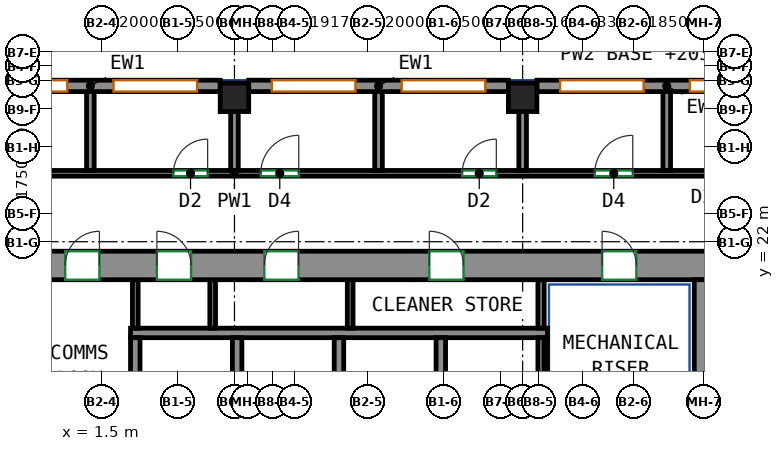
"""IFC4 building model, lengths in metres.
Left out: names, types, materials, properties, quantities, classifications, styles, units other than length and angle.
Written with IfcOpenShell. Run it as: python <this file> out.ifc"""

import sys

from ifc_helpers import new_model, si_unit, direction, frame, frame_2d, origin, origin_2d, place, context, subcontext, project, spatial, rectangle, extrude, source, transform, mapped, element, fill, save


model = new_model("IFC4")
c1 = context("Model", 3, precision=1e-05, world=origin(), true_north=direction((0.0, 1.0)))
c2 = subcontext(c1, "Body", "Model", "MODEL_VIEW")
j1 = project(units=[si_unit("LENGTHUNIT", "METRE"), si_unit("PLANEANGLEUNIT", "RADIAN")], contexts=[c1])
p1 = place(None, origin())
s1 = spatial("IfcSite", under=j1, at=p1, CompositionType="ELEMENT")
p2 = place(p1, origin())
s2 = spatial("IfcBuilding", under=s1, at=p2, CompositionType="ELEMENT")
p3 = place(p2, frame((0.0, 0.0, 203.3)))
s3 = spatial("IfcBuildingStorey", under=s2, at=p3, CompositionType="ELEMENT", Elevation=203.3)
m1 = source(origin(), c2, "Body", "SweptSolid", [
    extrude(rectangle(XDim=0.75, YDim=0.75, at=origin_2d()), origin(), (0.0, 0.0, 1.0), 3.12),
])
for number, where, z_axis, x_axis in (
    (1, (5.0, 25.8, 0.0), (0.0, 0.0, 1.0), (1.0, 0.0, 0.0)),
    (2, (12.583, 25.8, 0.0), (0.0, 0.0, 1.0), (1.0, 0.0, 0.0)),
):
    element("IfcColumn", number, at=place(p3, frame(where, z_axis=z_axis, x_axis=x_axis)), inside=s3, PredefinedType="COLUMN", context=c2, shape_type="MappedRepresentation", body=[
        mapped(m1, transform((0.0, 0.0, 0.0))),
    ])
m2 = source(origin(), c2, "Body", "SweptSolid", [
    extrude(rectangle(XDim=33.6, YDim=0.75, at=frame_2d((16.8, 0.0))), origin(), (0.0, 0.0, 1.0), 3.12),
])
p4 = place(p3, frame((-15.75, 21.375, 0.0), z_axis=(0.0, 0.0, 1.0), x_axis=(1.0, 0.0, 0.0)))
e3 = element("IfcWall", 3, at=p4, inside=s3, PredefinedType="SHEAR", context=c2, shape_type="MappedRepresentation", body=[
    mapped(m2, transform((0.0, 0.0, 0.0))),
])
p5 = place(p4, frame((6.581, 0.0, 0.0)))
e4 = element("IfcOpeningElement", 4, at=p5, cuts=e3, PredefinedType="OPENING", context=c2, shape_type="SweptSolid", body=[
    extrude(rectangle(XDim=0.9, YDim=2.1, at=frame_2d((0.45, 1.05))), frame((0.0, 0.385, 0.0), z_axis=(0.0, -1.0, 0.0), x_axis=(1.0, 0.0, 0.0)), (0.0, 0.0, 1.0), 0.77),
])
p6 = place(p4, frame((11.888, 0.0, 0.0)))
e5 = element("IfcOpeningElement", 5, at=p6, cuts=e3, PredefinedType="OPENING", context=c2, shape_type="SweptSolid", body=[
    extrude(rectangle(XDim=0.9, YDim=2.1, at=frame_2d((0.45, 1.05))), frame((0.0, 0.385, 0.0), z_axis=(0.0, -1.0, 0.0), x_axis=(1.0, 0.0, 0.0)), (0.0, 0.0, 1.0), 0.77),
])
p7 = place(p4, frame((16.296, 0.0, 0.0)))
e6 = element("IfcOpeningElement", 6, at=p7, cuts=e3, PredefinedType="OPENING", context=c2, shape_type="SweptSolid", body=[
    extrude(rectangle(XDim=0.9, YDim=2.1, at=frame_2d((0.45, 1.05))), frame((0.0, 0.385, 0.0), z_axis=(0.0, -1.0, 0.0), x_axis=(1.0, 0.0, 0.0)), (0.0, 0.0, 1.0), 0.77),
])
p8 = place(p4, frame((18.708, 0.0, 0.0)))
e7 = element("IfcOpeningElement", 7, at=p8, cuts=e3, PredefinedType="OPENING", context=c2, shape_type="SweptSolid", body=[
    extrude(rectangle(XDim=0.9, YDim=2.1, at=frame_2d((0.45, 1.05))), frame((0.0, 0.385, 0.0), z_axis=(0.0, -1.0, 0.0), x_axis=(1.0, 0.0, 0.0)), (0.0, 0.0, 1.0), 0.77),
])
p9 = place(p4, frame((21.536, 0.0, 0.0)))
e8 = element("IfcOpeningElement", 8, at=p9, cuts=e3, PredefinedType="OPENING", context=c2, shape_type="SweptSolid", body=[
    extrude(rectangle(XDim=0.9, YDim=2.1, at=frame_2d((0.45, 1.05))), frame((0.0, 0.385, 0.0), z_axis=(0.0, -1.0, 0.0), x_axis=(1.0, 0.0, 0.0)), (0.0, 0.0, 1.0), 0.77),
])
p10 = place(p4, frame((25.877, 0.0, 0.0)))
e9 = element("IfcOpeningElement", 9, at=p10, cuts=e3, PredefinedType="OPENING", context=c2, shape_type="SweptSolid", body=[
    extrude(rectangle(XDim=0.9, YDim=2.1, at=frame_2d((0.45, 1.05))), frame((0.0, 0.385, 0.0), z_axis=(0.0, -1.0, 0.0), x_axis=(1.0, 0.0, 0.0)), (0.0, 0.0, 1.0), 0.77),
])
p11 = place(p4, frame((2.275, 0.0, 0.0)))
e10 = element("IfcOpeningElement", 10, at=p11, cuts=e3, PredefinedType="OPENING", context=c2, shape_type="SweptSolid", body=[
    extrude(rectangle(XDim=0.9, YDim=2.1, at=frame_2d((0.45, 1.05))), frame((0.0, 0.385, 0.0), z_axis=(0.0, -1.0, 0.0), x_axis=(1.0, 0.0, 0.0)), (0.0, 0.0, 1.0), 0.77),
])
p12 = place(p4, frame((30.425, 0.0, 0.0)))
e11 = element("IfcOpeningElement", 11, at=p12, cuts=e3, PredefinedType="OPENING", context=c2, shape_type="SweptSolid", body=[
    extrude(rectangle(XDim=0.9, YDim=2.1, at=frame_2d((0.45, 1.05))), frame((0.0, 0.385, 0.0), z_axis=(0.0, -1.0, 0.0), x_axis=(1.0, 0.0, 0.0)), (0.0, 0.0, 1.0), 0.77),
])
m3 = source(origin(), c2, "Body", "SweptSolid", [
    extrude(rectangle(XDim=12.0, YDim=0.75, at=frame_2d((6.0, 0.0))), origin(), (0.0, 0.0, 1.0), 3.12),
])
p13 = place(p3, frame((17.475, 9.0, 0.0), z_axis=(0.0, 0.0, 1.0), x_axis=(0.0, 1.0, 0.0)))
e12 = element("IfcWall", 12, at=p13, inside=s3, PredefinedType="SHEAR", context=c2, shape_type="MappedRepresentation", body=[
    mapped(m3, transform((0.0, 0.0, 0.0))),
])
m4 = source(origin(), c2, "Body", "SweptSolid", [
    extrude(rectangle(XDim=6.833, YDim=0.3, at=frame_2d((3.417, 0.0))), origin(), (0.0, 0.0, 1.0), 3.12),
])
p14 = place(p3, frame((19.792, 26.1, 0.0), z_axis=(0.0, 0.0, 1.0), x_axis=(-1.0, 0.0, 0.0)))
e13 = element("IfcWall", 13, at=p14, inside=s3, PredefinedType="SOLIDWALL", context=c2, shape_type="MappedRepresentation", body=[
    mapped(m4, transform((0.0, 0.0, 0.0))),
])
p15 = place(p14, frame((0.608, 0.0, 0.85)))
e14 = element("IfcOpeningElement", 14, at=p15, cuts=e13, PredefinedType="OPENING", context=c2, shape_type="SweptSolid", body=[
    extrude(rectangle(XDim=2.2, YDim=1.95, at=frame_2d((1.1, 0.975))), frame((0.0, 0.16, 0.0), z_axis=(0.0, -1.0, 0.0), x_axis=(1.0, 0.0, 0.0)), (0.0, 0.0, 1.0), 0.32),
])
p16 = place(p14, frame((4.025, 0.0, 0.85)))
e15 = element("IfcOpeningElement", 15, at=p16, cuts=e13, PredefinedType="OPENING", context=c2, shape_type="SweptSolid", body=[
    extrude(rectangle(XDim=2.2, YDim=1.95, at=frame_2d((1.1, 0.975))), frame((0.0, 0.16, 0.0), z_axis=(0.0, -1.0, 0.0), x_axis=(1.0, 0.0, 0.0)), (0.0, 0.0, 1.0), 0.32),
])
m5 = source(origin(), c2, "Body", "SweptSolid", [
    extrude(rectangle(XDim=6.833, YDim=0.3, at=frame_2d((3.417, 0.0))), origin(), (0.0, 0.0, 1.0), 3.12),
])
p17 = place(p3, frame((12.208, 26.1, 0.0), z_axis=(0.0, 0.0, 1.0), x_axis=(-1.0, 0.0, 0.0)))
e16 = element("IfcWall", 16, at=p17, inside=s3, PredefinedType="SOLIDWALL", context=c2, shape_type="MappedRepresentation", body=[
    mapped(m5, transform((0.0, 0.0, 0.0))),
])
p18 = place(p17, frame((0.608, 0.0, 0.85)))
e17 = element("IfcOpeningElement", 17, at=p18, cuts=e16, PredefinedType="OPENING", context=c2, shape_type="SweptSolid", body=[
    extrude(rectangle(XDim=2.2, YDim=1.95, at=frame_2d((1.1, 0.975))), frame((0.0, 0.16, 0.0), z_axis=(0.0, -1.0, 0.0), x_axis=(1.0, 0.0, 0.0)), (0.0, 0.0, 1.0), 0.32),
])
p19 = place(p17, frame((4.025, 0.0, 0.85)))
e18 = element("IfcOpeningElement", 18, at=p19, cuts=e16, PredefinedType="OPENING", context=c2, shape_type="SweptSolid", body=[
    extrude(rectangle(XDim=2.2, YDim=1.95, at=frame_2d((1.1, 0.975))), frame((0.0, 0.16, 0.0), z_axis=(0.0, -1.0, 0.0), x_axis=(1.0, 0.0, 0.0)), (0.0, 0.0, 1.0), 0.32),
])
p20 = place(p3, frame((4.625, 26.1, 0.0), z_axis=(0.0, 0.0, 1.0), x_axis=(-1.0, 0.0, 0.0)))
e19 = element("IfcWall", 19, at=p20, inside=s3, PredefinedType="SOLIDWALL", context=c2, shape_type="MappedRepresentation", body=[
    mapped(m5, transform((0.0, 0.0, 0.0))),
])
p21 = place(p20, frame((0.608, 0.0, 0.85)))
e20 = element("IfcOpeningElement", 20, at=p21, cuts=e19, PredefinedType="OPENING", context=c2, shape_type="SweptSolid", body=[
    extrude(rectangle(XDim=2.2, YDim=1.95, at=frame_2d((1.1, 0.975))), frame((0.0, 0.16, 0.0), z_axis=(0.0, -1.0, 0.0), x_axis=(1.0, 0.0, 0.0)), (0.0, 0.0, 1.0), 0.32),
])
p22 = place(p20, frame((4.025, 0.0, 0.85)))
e21 = element("IfcOpeningElement", 21, at=p22, cuts=e19, PredefinedType="OPENING", context=c2, shape_type="SweptSolid", body=[
    extrude(rectangle(XDim=2.2, YDim=1.95, at=frame_2d((1.1, 0.975))), frame((0.0, 0.16, 0.0), z_axis=(0.0, -1.0, 0.0), x_axis=(1.0, 0.0, 0.0)), (0.0, 0.0, 1.0), 0.32),
])
m6 = source(origin(), c2, "Body", "SweptSolid", [
    extrude(rectangle(XDim=10.97, YDim=0.25, at=frame_2d((5.485, 0.0))), origin(), (0.0, 0.0, 1.0), 3.12),
])
p23 = place(p3, frame((2.265, 19.6, 0.0), z_axis=(0.0, 0.0, 1.0), x_axis=(1.0, 0.0, 0.0)))
e22 = element("IfcWall", 22, at=p23, inside=s3, PredefinedType="PARTITIONING", context=c2, shape_type="MappedRepresentation", body=[
    mapped(m6, transform((0.0, 0.0, 0.0))),
])
m7 = source(origin(), c2, "Body", "SweptSolid", [
    extrude(rectangle(XDim=3.275, YDim=0.165, at=frame_2d((1.638, 0.0))), origin(), (0.0, 0.0, 1.0), 3.12),
])
p24 = place(p3, frame((13.067, 16.2, 0.0), z_axis=(0.0, 0.0, 1.0), x_axis=(0.0, 1.0, 0.0)))
e23 = element("IfcWall", 23, at=p24, inside=s3, PredefinedType="PARTITIONING", context=c2, shape_type="MappedRepresentation", body=[
    mapped(m7, transform((0.0, 0.0, 0.0))),
])
m8 = source(origin(), c2, "Body", "SweptSolid", [
    extrude(rectangle(XDim=1.275, YDim=0.165, at=frame_2d((0.637, 0.0))), origin(), (0.0, 0.0, 1.0), 3.12),
])
p25 = place(p3, frame((13.067, 19.725, 0.0), z_axis=(0.0, 0.0, 1.0), x_axis=(0.0, 1.0, 0.0)))
e24 = element("IfcWall", 24, at=p25, inside=s3, PredefinedType="PARTITIONING", context=c2, shape_type="MappedRepresentation", body=[
    mapped(m8, transform((0.0, 0.0, 0.0))),
])
m9 = source(origin(), c2, "Body", "SweptSolid", [
    extrude(rectangle(XDim=3.275, YDim=0.25, at=frame_2d((1.638, 0.0))), origin(), (0.0, 0.0, 1.0), 3.12),
])
p26 = place(p3, frame((10.43, 16.2, 0.0), z_axis=(0.0, 0.0, 1.0), x_axis=(0.0, 1.0, 0.0)))
e25 = element("IfcWall", 25, at=p26, inside=s3, PredefinedType="PARTITIONING", context=c2, shape_type="MappedRepresentation", body=[
    mapped(m9, transform((0.0, 0.0, 0.0))),
])
m10 = source(origin(), c2, "Body", "SweptSolid", [
    extrude(rectangle(XDim=2.725, YDim=0.085, at=frame_2d((1.363, 0.0))), origin(), (0.0, 0.0, 1.0), 3.12),
])
p27 = place(p3, frame((13.192, 16.75, 0.0), z_axis=(0.0, 0.0, 1.0), x_axis=(0.0, 1.0, 0.0)))
e26 = element("IfcWall", 26, at=p27, inside=s3, PredefinedType="PARTITIONING", context=c2, shape_type="MappedRepresentation", body=[
    mapped(m10, transform((0.0, 0.0, 0.0))),
])
for number, where, z_axis, x_axis in (
    (27, (2.39, 16.2, 0.0), (0.0, 0.0, 1.0), (0.0, 1.0, 0.0)),
    (28, (5.07, 16.2, 0.0), (0.0, 0.0, 1.0), (0.0, 1.0, 0.0)),
    (29, (7.75, 16.2, 0.0), (0.0, 0.0, 1.0), (0.0, 1.0, 0.0)),
):
    element("IfcWall", number, at=place(p3, frame(where, z_axis=z_axis, x_axis=x_axis)), inside=s3, PredefinedType="PARTITIONING", context=c2, shape_type="MappedRepresentation", body=[
        mapped(m9, transform((0.0, 0.0, 0.0))),
    ])
m11 = source(origin(), c2, "Body", "SweptSolid", [
    extrude(rectangle(XDim=1.275, YDim=0.15, at=frame_2d((0.637, 0.0))), origin(), (0.0, 0.0, 1.0), 3.12),
])
for number, where, z_axis, x_axis in (
    (30, (2.39, 19.725, 0.0), (0.0, 0.0, 1.0), (0.0, 1.0, 0.0)),
    (31, (4.427, 19.725, 0.0), (0.0, 0.0, 1.0), (0.0, 1.0, 0.0)),
    (32, (8.045, 19.725, 0.0), (0.0, 0.0, 1.0), (0.0, 1.0, 0.0)),
):
    element("IfcWall", number, at=place(p3, frame(where, z_axis=z_axis, x_axis=x_axis)), inside=s3, PredefinedType="PARTITIONING", context=c2, shape_type="MappedRepresentation", body=[
        mapped(m11, transform((0.0, 0.0, 0.0))),
    ])
p28 = place(p3, frame((-17.85, 23.8, 0.0), z_axis=(0.0, 0.0, 1.0), x_axis=(1.0, 0.0, 0.0)))
e33 = element("IfcWall", 33, at=p28, inside=s3, PredefinedType="PARTITIONING", context=c2, shape_type="SweptSolid", body=[
    extrude(rectangle(XDim=45.7, YDim=0.15, at=frame_2d((22.85, 0.0))), origin(), (0.0, 0.0, 1.0), 3.12),
])
p29 = place(p28, frame((0.6, 0.0, 0.0)))
e34 = element("IfcOpeningElement", 34, at=p29, cuts=e33, PredefinedType="OPENING", context=c2, shape_type="SweptSolid", body=[
    extrude(rectangle(XDim=0.9, YDim=2.1, at=frame_2d((0.45, 1.05))), frame((0.0, 0.085, 0.0), z_axis=(0.0, -1.0, 0.0), x_axis=(1.0, 0.0, 0.0)), (0.0, 0.0, 1.0), 0.17),
])
p30 = place(p28, frame((4.081, 0.0, 0.0)))
e35 = element("IfcOpeningElement", 35, at=p30, cuts=e33, PredefinedType="OPENING", context=c2, shape_type="SweptSolid", body=[
    extrude(rectangle(XDim=1.0, YDim=2.1, at=frame_2d((0.5, 1.05))), frame((0.0, 0.085, 0.0), z_axis=(0.0, -1.0, 0.0), x_axis=(1.0, 0.0, 0.0)), (0.0, 0.0, 1.0), 0.17),
])
p31 = place(p28, frame((9.481, 0.0, 0.0)))
e36 = element("IfcOpeningElement", 36, at=p31, cuts=e33, PredefinedType="OPENING", context=c2, shape_type="SweptSolid", body=[
    extrude(rectangle(XDim=0.9, YDim=2.1, at=frame_2d((0.45, 1.05))), frame((0.0, 0.085, 0.0), z_axis=(0.0, -1.0, 0.0), x_axis=(1.0, 0.0, 0.0)), (0.0, 0.0, 1.0), 0.17),
])
p32 = place(p28, frame((12.803, 0.0, 0.0)))
e37 = element("IfcOpeningElement", 37, at=p32, cuts=e33, PredefinedType="OPENING", context=c2, shape_type="SweptSolid", body=[
    extrude(rectangle(XDim=1.0, YDim=2.1, at=frame_2d((0.5, 1.05))), frame((0.0, 0.085, 0.0), z_axis=(0.0, -1.0, 0.0), x_axis=(1.0, 0.0, 0.0)), (0.0, 0.0, 1.0), 0.17),
])
p33 = place(p28, frame((15.489, 0.0, 0.0)))
e38 = element("IfcOpeningElement", 38, at=p33, cuts=e33, PredefinedType="OPENING", context=c2, shape_type="SweptSolid", body=[
    extrude(rectangle(XDim=0.9, YDim=2.1, at=frame_2d((0.45, 1.05))), frame((0.0, 0.085, 0.0), z_axis=(0.0, -1.0, 0.0), x_axis=(1.0, 0.0, 0.0)), (0.0, 0.0, 1.0), 0.17),
])
p34 = place(p28, frame((21.244, 0.0, 0.0)))
e39 = element("IfcOpeningElement", 39, at=p34, cuts=e33, PredefinedType="OPENING", context=c2, shape_type="SweptSolid", body=[
    extrude(rectangle(XDim=0.9, YDim=2.1, at=frame_2d((0.45, 1.05))), frame((0.0, 0.085, 0.0), z_axis=(0.0, -1.0, 0.0), x_axis=(1.0, 0.0, 0.0)), (0.0, 0.0, 1.0), 0.17),
])
p35 = place(p28, frame((23.542, 0.0, 0.0)))
e40 = element("IfcOpeningElement", 40, at=p35, cuts=e33, PredefinedType="OPENING", context=c2, shape_type="SweptSolid", body=[
    extrude(rectangle(XDim=1.0, YDim=2.1, at=frame_2d((0.5, 1.05))), frame((0.0, 0.085, 0.0), z_axis=(0.0, -1.0, 0.0), x_axis=(1.0, 0.0, 0.0)), (0.0, 0.0, 1.0), 0.17),
])
p36 = place(p28, frame((28.841, 0.0, 0.0)))
e41 = element("IfcOpeningElement", 41, at=p36, cuts=e33, PredefinedType="OPENING", context=c2, shape_type="SweptSolid", body=[
    extrude(rectangle(XDim=0.9, YDim=2.1, at=frame_2d((0.45, 1.05))), frame((0.0, 0.085, 0.0), z_axis=(0.0, -1.0, 0.0), x_axis=(1.0, 0.0, 0.0)), (0.0, 0.0, 1.0), 0.17),
])
p37 = place(p28, frame((32.331, 0.0, 0.0)))
e42 = element("IfcOpeningElement", 42, at=p37, cuts=e33, PredefinedType="OPENING", context=c2, shape_type="SweptSolid", body=[
    extrude(rectangle(XDim=1.0, YDim=2.1, at=frame_2d((0.5, 1.05))), frame((0.0, 0.085, 0.0), z_axis=(0.0, -1.0, 0.0), x_axis=(1.0, 0.0, 0.0)), (0.0, 0.0, 1.0), 0.17),
])
p38 = place(p28, frame((35.42, 0.0, 0.0)))
e43 = element("IfcOpeningElement", 43, at=p38, cuts=e33, PredefinedType="OPENING", context=c2, shape_type="SweptSolid", body=[
    extrude(rectangle(XDim=0.9, YDim=2.1, at=frame_2d((0.45, 1.05))), frame((0.0, 0.085, 0.0), z_axis=(0.0, -1.0, 0.0), x_axis=(1.0, 0.0, 0.0)), (0.0, 0.0, 1.0), 0.17),
])
p39 = place(p28, frame((40.317, 0.0, 0.0)))
e44 = element("IfcOpeningElement", 44, at=p39, cuts=e33, PredefinedType="OPENING", context=c2, shape_type="SweptSolid", body=[
    extrude(rectangle(XDim=0.9, YDim=2.1, at=frame_2d((0.45, 1.05))), frame((0.0, 0.085, 0.0), z_axis=(0.0, -1.0, 0.0), x_axis=(1.0, 0.0, 0.0)), (0.0, 0.0, 1.0), 0.17),
])
p40 = place(p28, frame((43.199, 0.0, 0.0)))
e45 = element("IfcOpeningElement", 45, at=p40, cuts=e33, PredefinedType="OPENING", context=c2, shape_type="SweptSolid", body=[
    extrude(rectangle(XDim=1.0, YDim=2.1, at=frame_2d((0.5, 1.05))), frame((0.0, 0.085, 0.0), z_axis=(0.0, -1.0, 0.0), x_axis=(1.0, 0.0, 0.0)), (0.0, 0.0, 1.0), 0.17),
])
p41 = place(p3, frame((1.208, 23.877, 0.0), z_axis=(0.0, 0.0, 1.0), x_axis=(0.0, 1.0, 0.0)))
e46 = element("IfcWall", 46, at=p41, inside=s3, PredefinedType="PARTITIONING", context=c2, shape_type="SweptSolid", body=[
    extrude(rectangle(XDim=2.123, YDim=0.2, at=frame_2d((1.062, 0.0))), origin(), (0.0, 0.0, 1.0), 3.12),
])
p42 = place(p3, frame((5.0, 23.877, 0.0), z_axis=(0.0, 0.0, 1.0), x_axis=(0.0, 1.0, 0.0)))
e47 = element("IfcWall", 47, at=p42, inside=s3, PredefinedType="PARTITIONING", context=c2, shape_type="SweptSolid", body=[
    extrude(rectangle(XDim=1.548, YDim=0.2, at=frame_2d((0.774, 0.0))), origin(), (0.0, 0.0, 1.0), 3.12),
])
p43 = place(p3, frame((8.791, 23.877, 0.0), z_axis=(0.0, 0.0, 1.0), x_axis=(0.0, 1.0, 0.0)))
e48 = element("IfcWall", 48, at=p43, inside=s3, PredefinedType="PARTITIONING", context=c2, shape_type="SweptSolid", body=[
    extrude(rectangle(XDim=2.123, YDim=0.2, at=frame_2d((1.062, 0.0))), origin(), (0.0, 0.0, 1.0), 3.12),
])
p44 = place(p3, frame((12.583, 23.877, 0.0), z_axis=(0.0, 0.0, 1.0), x_axis=(0.0, 1.0, 0.0)))
e49 = element("IfcWall", 49, at=p44, inside=s3, PredefinedType="PARTITIONING", context=c2, shape_type="SweptSolid", body=[
    extrude(rectangle(XDim=1.548, YDim=0.2, at=frame_2d((0.774, 0.0))), origin(), (0.0, 0.0, 1.0), 3.12),
])
p45 = place(p3, frame((16.375, 23.877, 0.0), z_axis=(0.0, 0.0, 1.0), x_axis=(0.0, 1.0, 0.0)))
e50 = element("IfcWall", 50, at=p45, inside=s3, PredefinedType="PARTITIONING", context=c2, shape_type="SweptSolid", body=[
    extrude(rectangle(XDim=2.123, YDim=0.2, at=frame_2d((1.062, 0.0))), origin(), (0.0, 0.0, 1.0), 3.12),
])
p46 = place(p15, origin())
e51 = element("IfcWindow", 51, at=p46, inside=s3, PartitioningType="SINGLE_PANEL", PredefinedType="WINDOW", context=c2, shape_type="SweptSolid", body=[
    extrude(rectangle(XDim=2.2, YDim=1.95, at=frame_2d((1.1, 0.975))), frame((0.0, 0.03, 0.0), z_axis=(0.0, -1.0, 0.0), x_axis=(1.0, 0.0, 0.0)), (0.0, 0.0, 1.0), 0.06),
])
fill(e14, e51)
p47 = place(p16, origin())
e52 = element("IfcWindow", 52, at=p47, inside=s3, PartitioningType="SINGLE_PANEL", PredefinedType="WINDOW", context=c2, shape_type="SweptSolid", body=[
    extrude(rectangle(XDim=2.2, YDim=1.95, at=frame_2d((1.1, 0.975))), frame((0.0, 0.03, 0.0), z_axis=(0.0, -1.0, 0.0), x_axis=(1.0, 0.0, 0.0)), (0.0, 0.0, 1.0), 0.06),
])
fill(e15, e52)
p48 = place(p18, origin())
e53 = element("IfcWindow", 53, at=p48, inside=s3, PartitioningType="SINGLE_PANEL", PredefinedType="WINDOW", context=c2, shape_type="SweptSolid", body=[
    extrude(rectangle(XDim=2.2, YDim=1.95, at=frame_2d((1.1, 0.975))), frame((0.0, 0.03, 0.0), z_axis=(0.0, -1.0, 0.0), x_axis=(1.0, 0.0, 0.0)), (0.0, 0.0, 1.0), 0.06),
])
fill(e17, e53)
p49 = place(p19, origin())
e54 = element("IfcWindow", 54, at=p49, inside=s3, PartitioningType="SINGLE_PANEL", PredefinedType="WINDOW", context=c2, shape_type="SweptSolid", body=[
    extrude(rectangle(XDim=2.2, YDim=1.95, at=frame_2d((1.1, 0.975))), frame((0.0, 0.03, 0.0), z_axis=(0.0, -1.0, 0.0), x_axis=(1.0, 0.0, 0.0)), (0.0, 0.0, 1.0), 0.06),
])
fill(e18, e54)
p50 = place(p21, origin())
e55 = element("IfcWindow", 55, at=p50, inside=s3, PartitioningType="SINGLE_PANEL", PredefinedType="WINDOW", context=c2, shape_type="SweptSolid", body=[
    extrude(rectangle(XDim=2.2, YDim=1.95, at=frame_2d((1.1, 0.975))), frame((0.0, 0.03, 0.0), z_axis=(0.0, -1.0, 0.0), x_axis=(1.0, 0.0, 0.0)), (0.0, 0.0, 1.0), 0.06),
])
fill(e20, e55)
p51 = place(p22, origin())
e56 = element("IfcWindow", 56, at=p51, inside=s3, PartitioningType="SINGLE_PANEL", PredefinedType="WINDOW", context=c2, shape_type="SweptSolid", body=[
    extrude(rectangle(XDim=2.2, YDim=1.95, at=frame_2d((1.1, 0.975))), frame((0.0, 0.03, 0.0), z_axis=(0.0, -1.0, 0.0), x_axis=(1.0, 0.0, 0.0)), (0.0, 0.0, 1.0), 0.06),
])
fill(e21, e56)
p52 = place(p7, origin())
e57 = element("IfcDoor", 57, at=p52, inside=s3, OperationType="SINGLE_SWING_RIGHT", PredefinedType="DOOR", context=c2, shape_type="SweptSolid", body=[
    extrude(rectangle(XDim=0.9, YDim=2.1, at=frame_2d((0.45, 1.05))), frame((0.0, -0.23, 0.0), z_axis=(0.0, -1.0, 0.0), x_axis=(1.0, 0.0, 0.0)), (0.0, 0.0, 1.0), 0.05),
])
fill(e6, e57)
p53 = place(p8, origin())
e58 = element("IfcDoor", 58, at=p53, inside=s3, OperationType="SINGLE_SWING_LEFT", PredefinedType="DOOR", context=c2, shape_type="SweptSolid", body=[
    extrude(rectangle(XDim=0.9, YDim=2.1, at=frame_2d((0.45, 1.05))), frame((0.0, -0.23, 0.0), z_axis=(0.0, -1.0, 0.0), x_axis=(1.0, 0.0, 0.0)), (0.0, 0.0, 1.0), 0.05),
])
fill(e7, e58)
p54 = place(p9, origin())
e59 = element("IfcDoor", 59, at=p54, inside=s3, OperationType="SINGLE_SWING_RIGHT", PredefinedType="DOOR", context=c2, shape_type="SweptSolid", body=[
    extrude(rectangle(XDim=0.9, YDim=2.1, at=frame_2d((0.45, 1.05))), frame((0.0, -0.23, 0.0), z_axis=(0.0, -1.0, 0.0), x_axis=(1.0, 0.0, 0.0)), (0.0, 0.0, 1.0), 0.05),
])
fill(e8, e59)
p55 = place(p10, origin())
e60 = element("IfcDoor", 60, at=p55, inside=s3, OperationType="SINGLE_SWING_LEFT", PredefinedType="DOOR", context=c2, shape_type="SweptSolid", body=[
    extrude(rectangle(XDim=0.9, YDim=2.1, at=frame_2d((0.45, 1.05))), frame((0.0, -0.23, 0.0), z_axis=(0.0, -1.0, 0.0), x_axis=(1.0, 0.0, 0.0)), (0.0, 0.0, 1.0), 0.05),
])
fill(e9, e60)
p56 = place(p12, origin())
e61 = element("IfcDoor", 61, at=p56, inside=s3, OperationType="SINGLE_SWING_LEFT", PredefinedType="DOOR", context=c2, shape_type="SweptSolid", body=[
    extrude(rectangle(XDim=0.9, YDim=2.1, at=frame_2d((0.45, 1.05))), frame((0.0, -0.23, 0.0), z_axis=(0.0, -1.0, 0.0), x_axis=(1.0, 0.0, 0.0)), (0.0, 0.0, 1.0), 0.05),
])
fill(e11, e61)
p57 = place(p34, origin())
e62 = element("IfcDoor", 62, at=p57, inside=s3, OperationType="SINGLE_SWING_RIGHT", PredefinedType="DOOR", context=c2, shape_type="SweptSolid", body=[
    extrude(rectangle(XDim=0.9, YDim=2.1, at=frame_2d((0.45, 1.05))), frame((0.0, 0.025, 0.0), z_axis=(0.0, -1.0, 0.0), x_axis=(1.0, 0.0, 0.0)), (0.0, 0.0, 1.0), 0.05),
])
fill(e39, e62)
p58 = place(p35, origin())
e63 = element("IfcDoor", 63, at=p58, inside=s3, OperationType="SINGLE_SWING_RIGHT", PredefinedType="DOOR", context=c2, shape_type="SweptSolid", body=[
    extrude(rectangle(XDim=1.0, YDim=2.1, at=frame_2d((0.5, 1.05))), frame((0.0, 0.025, 0.0), z_axis=(0.0, -1.0, 0.0), x_axis=(1.0, 0.0, 0.0)), (0.0, 0.0, 1.0), 0.05),
])
fill(e40, e63)
p59 = place(p36, origin())
e64 = element("IfcDoor", 64, at=p59, inside=s3, OperationType="SINGLE_SWING_RIGHT", PredefinedType="DOOR", context=c2, shape_type="SweptSolid", body=[
    extrude(rectangle(XDim=0.9, YDim=2.1, at=frame_2d((0.45, 1.05))), frame((0.0, 0.025, 0.0), z_axis=(0.0, -1.0, 0.0), x_axis=(1.0, 0.0, 0.0)), (0.0, 0.0, 1.0), 0.05),
])
fill(e41, e64)
p60 = place(p37, origin())
e65 = element("IfcDoor", 65, at=p60, inside=s3, OperationType="SINGLE_SWING_RIGHT", PredefinedType="DOOR", context=c2, shape_type="SweptSolid", body=[
    extrude(rectangle(XDim=1.0, YDim=2.1, at=frame_2d((0.5, 1.05))), frame((0.0, 0.025, 0.0), z_axis=(0.0, -1.0, 0.0), x_axis=(1.0, 0.0, 0.0)), (0.0, 0.0, 1.0), 0.05),
])
fill(e42, e65)
save(model, sys.argv[1])
